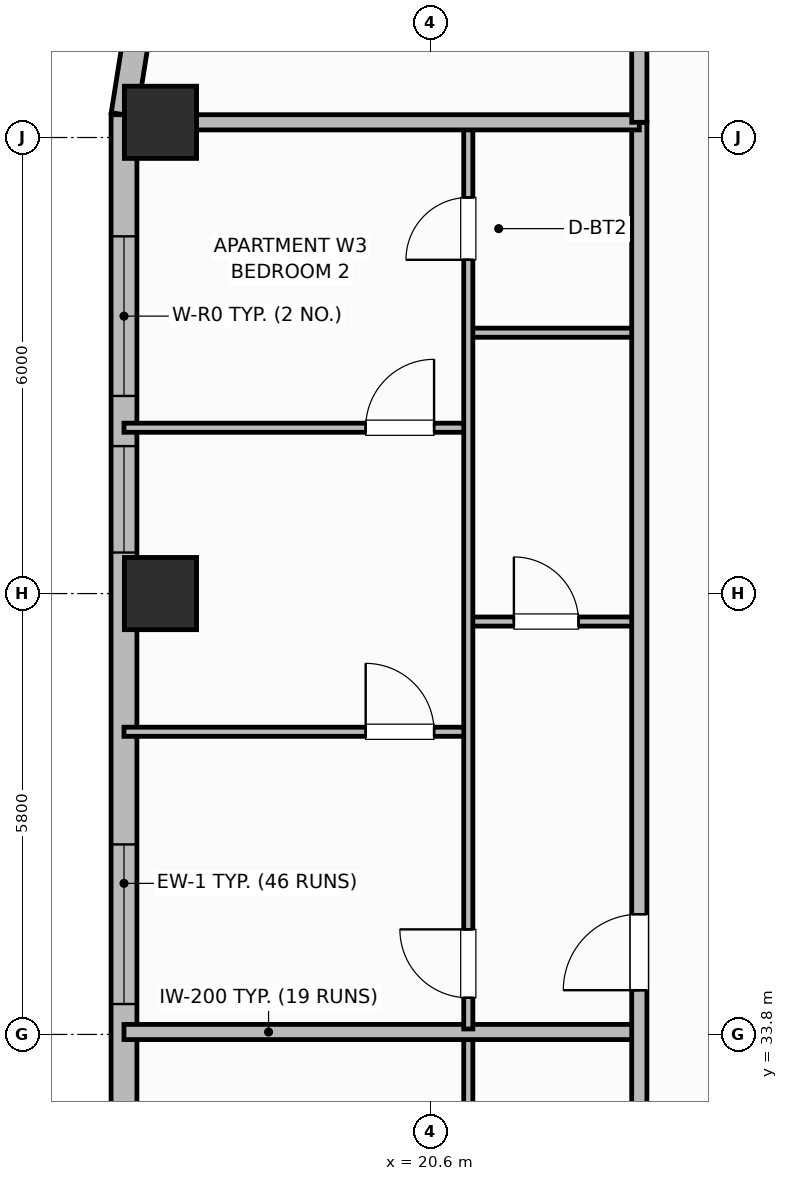
"""IFC4 building model, lengths in metres.
Left out: names, types, materials, properties, quantities, classifications, styles, units other than length and angle.
Written with IfcOpenShell. Run it as: python <this file> out.ifc"""

import sys

from ifc_helpers import new_model, si_unit, direction, frame, frame_2d, origin, origin_2d, place, context, subcontext, project, spatial, rectangle, extrude, element, fill, save


model = new_model("IFC4")
c1 = context("Model", 3, precision=1e-05, world=origin(), true_north=direction((0.0, 1.0)))
c2 = subcontext(c1, "Body", "Model", "MODEL_VIEW")
j1 = project(units=[si_unit("LENGTHUNIT", "METRE"), si_unit("PLANEANGLEUNIT", "RADIAN")], contexts=[c1])
p1 = place(None, origin())
s1 = spatial("IfcSite", under=j1, at=p1, CompositionType="ELEMENT")
p2 = place(p1, origin())
s2 = spatial("IfcBuilding", under=s1, at=p2, CompositionType="ELEMENT")
p3 = place(p2, frame((0.0, 0.0, 162.6)))
s3 = spatial("IfcBuildingStorey", under=s2, at=p3, CompositionType="ELEMENT", Elevation=162.6)
for number, where, z_axis, x_axis in (
    (1, (17.05, 39.6, 0.0), (0.0, 0.0, 1.0), (1.0, 0.0, 0.0)),
    (2, (17.05, 45.8, 0.0), (0.0, 0.0, 1.0), (1.0, 0.0, 0.0)),
):
    element("IfcColumn", number, at=place(p3, frame(where, z_axis=z_axis, x_axis=x_axis)), inside=s3, PredefinedType="COLUMN", context=c2, shape_type="SweptSolid", body=[
        extrude(rectangle(XDim=0.95, YDim=0.95, at=origin_2d()), origin(), (0.0, 0.0, 1.0), 3.7),
    ])
p4 = place(p3, frame((16.748, 47.022, 0.0), z_axis=(0.0, 0.0, 1.0), x_axis=(-0.156481329164, -0.987680916907, 0.0)))
e3 = element("IfcWall", 3, at=p4, inside=s3, PredefinedType="SOLIDWALL", context=c2, shape_type="SweptSolid", body=[
    extrude(rectangle(XDim=1.136, YDim=0.34, at=frame_2d((0.568, 0.0))), origin(), (0.0, 0.0, 1.0), 2.72),
])
p5 = place(p3, frame((16.57, 45.9, 0.0), z_axis=(0.0, 0.0, 1.0), x_axis=(0.0, -1.0, 0.0)))
e4 = element("IfcWall", 4, at=p5, inside=s3, PredefinedType="SOLIDWALL", context=c2, shape_type="SweptSolid", body=[
    extrude(rectangle(XDim=13.3, YDim=0.34, at=frame_2d((6.65, 0.0))), origin(), (0.0, 0.0, 1.0), 2.72),
])
p6 = place(p5, frame((1.6, 0.0, 0.7)))
e5 = element("IfcOpeningElement", 5, at=p6, cuts=e4, PredefinedType="OPENING", context=c2, shape_type="SweptSolid", body=[
    extrude(rectangle(XDim=2.1, YDim=1.9, at=frame_2d((1.05, 0.95))), frame((0.0, 0.18, 0.0), z_axis=(0.0, -1.0, 0.0), x_axis=(1.0, 0.0, 0.0)), (0.0, 0.0, 1.0), 0.36),
])
p7 = place(p5, frame((4.36, 0.0, 0.71)))
e6 = element("IfcOpeningElement", 6, at=p7, cuts=e4, PredefinedType="OPENING", context=c2, shape_type="SweptSolid", body=[
    extrude(rectangle(XDim=1.4, YDim=1.85, at=frame_2d((0.7, 0.925))), frame((0.0, 0.18, 0.0), z_axis=(0.0, -1.0, 0.0), x_axis=(1.0, 0.0, 0.0)), (0.0, 0.0, 1.0), 0.36),
])
p8 = place(p5, frame((9.6, 0.0, 0.7)))
e7 = element("IfcOpeningElement", 7, at=p8, cuts=e4, PredefinedType="OPENING", context=c2, shape_type="SweptSolid", body=[
    extrude(rectangle(XDim=2.1, YDim=1.9, at=frame_2d((1.05, 0.95))), frame((0.0, 0.18, 0.0), z_axis=(0.0, -1.0, 0.0), x_axis=(1.0, 0.0, 0.0)), (0.0, 0.0, 1.0), 0.36),
])
p9 = place(p3, frame((21.1, 22.74, 0.0), z_axis=(0.0, 0.0, 1.0), x_axis=(0.0, 1.0, 0.0)))
e8 = element("IfcWall", 8, at=p9, inside=s3, PredefinedType="PARTITIONING", context=c2, shape_type="SweptSolid", body=[
    extrude(rectangle(XDim=11.052, YDim=0.12, at=frame_2d((5.526, 0.0))), origin(), (0.0, 0.0, 1.0), 2.55),
])
p10 = place(p9, frame((0.41, 0.0, 0.0)))
e9 = element("IfcOpeningElement", 9, at=p10, cuts=e8, PredefinedType="OPENING", context=c2, shape_type="SweptSolid", body=[
    extrude(rectangle(XDim=0.9, YDim=2.1, at=frame_2d((0.45, 1.05))), frame((0.0, 0.07, 0.0), z_axis=(0.0, -1.0, 0.0), x_axis=(1.0, 0.0, 0.0)), (0.0, 0.0, 1.0), 0.14),
])
p11 = place(p3, frame((16.57, 33.832, 0.0), z_axis=(0.0, 0.0, 1.0), x_axis=(1.0, 0.0, 0.0)))
e10 = element("IfcWall", 10, at=p11, inside=s3, PredefinedType="PARTITIONING", context=c2, shape_type="SweptSolid", body=[
    extrude(rectangle(XDim=6.78, YDim=0.2, at=frame_2d((3.39, 0.0))), origin(), (0.0, 0.0, 1.0), 2.55),
])
p12 = place(p3, frame((21.1, 39.232, 0.0), z_axis=(0.0, 0.0, 1.0), x_axis=(1.0, 0.0, 0.0)))
e11 = element("IfcWall", 11, at=p12, inside=s3, PredefinedType="PARTITIONING", context=c2, shape_type="SweptSolid", body=[
    extrude(rectangle(XDim=2.25, YDim=0.12, at=frame_2d((1.125, 0.0))), origin(), (0.0, 0.0, 1.0), 2.55),
])
p13 = place(p12, frame((0.6, 0.0, 0.0)))
e12 = element("IfcOpeningElement", 12, at=p13, cuts=e11, PredefinedType="OPENING", context=c2, shape_type="SweptSolid", body=[
    extrude(rectangle(XDim=0.85, YDim=2.1, at=frame_2d((0.425, 1.05))), frame((0.0, 0.07, 0.0), z_axis=(0.0, -1.0, 0.0), x_axis=(1.0, 0.0, 0.0)), (0.0, 0.0, 1.0), 0.14),
])
p14 = place(p3, frame((21.1, 43.032, 0.0), z_axis=(0.0, 0.0, 1.0), x_axis=(1.0, 0.0, 0.0)))
e13 = element("IfcWall", 13, at=p14, inside=s3, PredefinedType="PARTITIONING", context=c2, shape_type="SweptSolid", body=[
    extrude(rectangle(XDim=2.25, YDim=0.12, at=frame_2d((1.125, 0.0))), origin(), (0.0, 0.0, 1.0), 2.55),
])
p15 = place(p3, frame((16.57, 37.782, 0.0), z_axis=(0.0, 0.0, 1.0), x_axis=(1.0, 0.0, 0.0)))
e14 = element("IfcWall", 14, at=p15, inside=s3, PredefinedType="PARTITIONING", context=c2, shape_type="SweptSolid", body=[
    extrude(rectangle(XDim=4.53, YDim=0.12, at=frame_2d((2.265, 0.0))), origin(), (0.0, 0.0, 1.0), 2.55),
])
p16 = place(p15, frame((3.18, 0.0, 0.0)))
e15 = element("IfcOpeningElement", 15, at=p16, cuts=e14, PredefinedType="OPENING", context=c2, shape_type="SweptSolid", body=[
    extrude(rectangle(XDim=0.9, YDim=2.1, at=frame_2d((0.45, 1.05))), frame((0.0, 0.07, 0.0), z_axis=(0.0, -1.0, 0.0), x_axis=(1.0, 0.0, 0.0)), (0.0, 0.0, 1.0), 0.14),
])
p17 = place(p3, frame((16.57, 41.782, 0.0), z_axis=(0.0, 0.0, 1.0), x_axis=(1.0, 0.0, 0.0)))
e16 = element("IfcWall", 16, at=p17, inside=s3, PredefinedType="PARTITIONING", context=c2, shape_type="SweptSolid", body=[
    extrude(rectangle(XDim=4.53, YDim=0.12, at=frame_2d((2.265, 0.0))), origin(), (0.0, 0.0, 1.0), 2.55),
])
p18 = place(p17, frame((3.18, 0.0, 0.0)))
e17 = element("IfcOpeningElement", 17, at=p18, cuts=e16, PredefinedType="OPENING", context=c2, shape_type="SweptSolid", body=[
    extrude(rectangle(XDim=0.9, YDim=2.1, at=frame_2d((0.45, 1.05))), frame((0.0, 0.07, 0.0), z_axis=(0.0, -1.0, 0.0), x_axis=(1.0, 0.0, 0.0)), (0.0, 0.0, 1.0), 0.14),
])
p19 = place(p3, frame((21.1, 33.872, 0.0), z_axis=(0.0, 0.0, 1.0), x_axis=(0.0, 1.0, 0.0)))
e18 = element("IfcWall", 18, at=p19, inside=s3, PredefinedType="PARTITIONING", context=c2, shape_type="SweptSolid", body=[
    extrude(rectangle(XDim=11.888, YDim=0.12, at=frame_2d((5.944, 0.0))), origin(), (0.0, 0.0, 1.0), 2.55),
])
p20 = place(p19, frame((0.41, 0.0, 0.0)))
e19 = element("IfcOpeningElement", 19, at=p20, cuts=e18, PredefinedType="OPENING", context=c2, shape_type="SweptSolid", body=[
    extrude(rectangle(XDim=0.9, YDim=2.1, at=frame_2d((0.45, 1.05))), frame((0.0, 0.07, 0.0), z_axis=(0.0, -1.0, 0.0), x_axis=(1.0, 0.0, 0.0)), (0.0, 0.0, 1.0), 0.14),
])
p21 = place(p19, frame((10.119, 0.0, 0.0)))
e20 = element("IfcOpeningElement", 20, at=p21, cuts=e18, PredefinedType="OPENING", context=c2, shape_type="SweptSolid", body=[
    extrude(rectangle(XDim=0.82, YDim=2.08, at=frame_2d((0.41, 1.04))), frame((0.0, 0.07, 0.0), z_axis=(0.0, -1.0, 0.0), x_axis=(1.0, 0.0, 0.0)), (0.0, 0.0, 1.0), 0.14),
])
p22 = place(p3, frame((23.35, 10.6, 0.0), z_axis=(0.0, 0.0, 1.0), x_axis=(0.0, 1.0, 0.0)))
e21 = element("IfcWall", 21, at=p22, inside=s3, PredefinedType="PARTITIONING", context=c2, shape_type="SweptSolid", body=[
    extrude(rectangle(XDim=35.2, YDim=0.2, at=frame_2d((17.6, 0.0))), origin(), (0.0, 0.0, 1.0), 2.55),
])
p23 = place(p22, frame((2.65, 0.0, 0.0)))
e22 = element("IfcOpeningElement", 22, at=p23, cuts=e21, PredefinedType="OPENING", context=c2, shape_type="SweptSolid", body=[
    extrude(rectangle(XDim=1.0, YDim=2.15, at=frame_2d((0.5, 1.075))), frame((0.0, 0.11, 0.0), z_axis=(0.0, -1.0, 0.0), x_axis=(1.0, 0.0, 0.0)), (0.0, 0.0, 1.0), 0.22),
])
p24 = place(p22, frame((12.65, 0.0, 0.0)))
e23 = element("IfcOpeningElement", 23, at=p24, cuts=e21, PredefinedType="OPENING", context=c2, shape_type="SweptSolid", body=[
    extrude(rectangle(XDim=1.0, YDim=2.15, at=frame_2d((0.5, 1.075))), frame((0.0, 0.11, 0.0), z_axis=(0.0, -1.0, 0.0), x_axis=(1.0, 0.0, 0.0)), (0.0, 0.0, 1.0), 0.22),
])
p25 = place(p22, frame((23.782, 0.0, 0.0)))
e24 = element("IfcOpeningElement", 24, at=p25, cuts=e21, PredefinedType="OPENING", context=c2, shape_type="SweptSolid", body=[
    extrude(rectangle(XDim=1.0, YDim=2.15, at=frame_2d((0.5, 1.075))), frame((0.0, 0.11, 0.0), z_axis=(0.0, -1.0, 0.0), x_axis=(1.0, 0.0, 0.0)), (0.0, 0.0, 1.0), 0.22),
])
p26 = place(p3, frame((16.99, 45.8, 0.0), z_axis=(0.0, 0.0, 1.0), x_axis=(1.0, 0.0, 0.0)))
e25 = element("IfcWall", 25, at=p26, inside=s3, PredefinedType="PARTITIONING", context=c2, shape_type="SweptSolid", body=[
    extrude(rectangle(XDim=6.36, YDim=0.2, at=frame_2d((3.18, 0.0))), origin(), (0.0, 0.0, 1.0), 2.55),
])
p27 = place(p3, frame((23.35, 45.8, 0.0), z_axis=(0.0, 0.0, 1.0), x_axis=(0.0, 1.0, 0.0)))
e26 = element("IfcWall", 26, at=p27, inside=s3, PredefinedType="PARTITIONING", context=c2, shape_type="SweptSolid", body=[
    extrude(rectangle(XDim=3.73, YDim=0.2, at=frame_2d((1.865, 0.0))), origin(), (0.0, 0.0, 1.0), 2.55),
])
p28 = place(p6, origin())
e27 = element("IfcWindow", 27, at=p28, inside=s3, PartitioningType="SINGLE_PANEL", PredefinedType="WINDOW", context=c2, shape_type="SweptSolid", body=[
    extrude(rectangle(XDim=2.1, YDim=1.9, at=frame_2d((1.05, 0.95))), frame((0.0, 0.03, 0.0), z_axis=(0.0, -1.0, 0.0), x_axis=(1.0, 0.0, 0.0)), (0.0, 0.0, 1.0), 0.06),
])
fill(e5, e27)
p29 = place(p7, origin())
e28 = element("IfcWindow", 28, at=p29, inside=s3, PartitioningType="SINGLE_PANEL", PredefinedType="WINDOW", context=c2, shape_type="SweptSolid", body=[
    extrude(rectangle(XDim=1.4, YDim=1.85, at=frame_2d((0.7, 0.925))), frame((0.0, 0.03, 0.0), z_axis=(0.0, -1.0, 0.0), x_axis=(1.0, 0.0, 0.0)), (0.0, 0.0, 1.0), 0.06),
])
fill(e6, e28)
p30 = place(p8, origin())
e29 = element("IfcWindow", 29, at=p30, inside=s3, PartitioningType="SINGLE_PANEL", PredefinedType="WINDOW", context=c2, shape_type="SweptSolid", body=[
    extrude(rectangle(XDim=2.1, YDim=1.9, at=frame_2d((1.05, 0.95))), frame((0.0, 0.03, 0.0), z_axis=(0.0, -1.0, 0.0), x_axis=(1.0, 0.0, 0.0)), (0.0, 0.0, 1.0), 0.06),
])
fill(e7, e29)
p31 = place(p13, origin())
e30 = element("IfcDoor", 30, at=p31, inside=s3, OperationType="SINGLE_SWING_LEFT", PredefinedType="DOOR", context=c2, shape_type="SweptSolid", body=[
    extrude(rectangle(XDim=0.85, YDim=2.1, at=frame_2d((0.425, 1.05))), frame((0.0, 0.025, 0.0), z_axis=(0.0, -1.0, 0.0), x_axis=(1.0, 0.0, 0.0)), (0.0, 0.0, 1.0), 0.05),
])
fill(e12, e30)
p32 = place(p16, origin())
e31 = element("IfcDoor", 31, at=p32, inside=s3, OperationType="SINGLE_SWING_LEFT", PredefinedType="DOOR", context=c2, shape_type="SweptSolid", body=[
    extrude(rectangle(XDim=0.9, YDim=2.1, at=frame_2d((0.45, 1.05))), frame((0.0, 0.025, 0.0), z_axis=(0.0, -1.0, 0.0), x_axis=(1.0, 0.0, 0.0)), (0.0, 0.0, 1.0), 0.05),
])
fill(e15, e31)
p33 = place(p18, origin())
e32 = element("IfcDoor", 32, at=p33, inside=s3, OperationType="SINGLE_SWING_RIGHT", PredefinedType="DOOR", context=c2, shape_type="SweptSolid", body=[
    extrude(rectangle(XDim=0.9, YDim=2.1, at=frame_2d((0.45, 1.05))), frame((0.0, 0.025, 0.0), z_axis=(0.0, -1.0, 0.0), x_axis=(1.0, 0.0, 0.0)), (0.0, 0.0, 1.0), 0.05),
])
fill(e17, e32)
p34 = place(p20, origin())
e33 = element("IfcDoor", 33, at=p34, inside=s3, OperationType="SINGLE_SWING_RIGHT", PredefinedType="DOOR", context=c2, shape_type="SweptSolid", body=[
    extrude(rectangle(XDim=0.9, YDim=2.1, at=frame_2d((0.45, 1.05))), frame((0.0, 0.025, 0.0), z_axis=(0.0, -1.0, 0.0), x_axis=(1.0, 0.0, 0.0)), (0.0, 0.0, 1.0), 0.05),
])
fill(e19, e33)
p35 = place(p21, origin())
e34 = element("IfcDoor", 34, at=p35, inside=s3, OperationType="SINGLE_SWING_LEFT", PredefinedType="DOOR", context=c2, shape_type="SweptSolid", body=[
    extrude(rectangle(XDim=0.82, YDim=2.08, at=frame_2d((0.41, 1.04))), frame((0.0, 0.025, 0.0), z_axis=(0.0, -1.0, 0.0), x_axis=(1.0, 0.0, 0.0)), (0.0, 0.0, 1.0), 0.05),
])
fill(e20, e34)
p36 = place(p25, origin())
e35 = element("IfcDoor", 35, at=p36, inside=s3, OperationType="SINGLE_SWING_LEFT", PredefinedType="DOOR", context=c2, shape_type="SweptSolid", body=[
    extrude(rectangle(XDim=1.0, YDim=2.15, at=frame_2d((0.5, 1.075))), frame((0.0, 0.025, 0.0), z_axis=(0.0, -1.0, 0.0), x_axis=(1.0, 0.0, 0.0)), (0.0, 0.0, 1.0), 0.05),
])
fill(e24, e35)
save(model, sys.argv[1])
